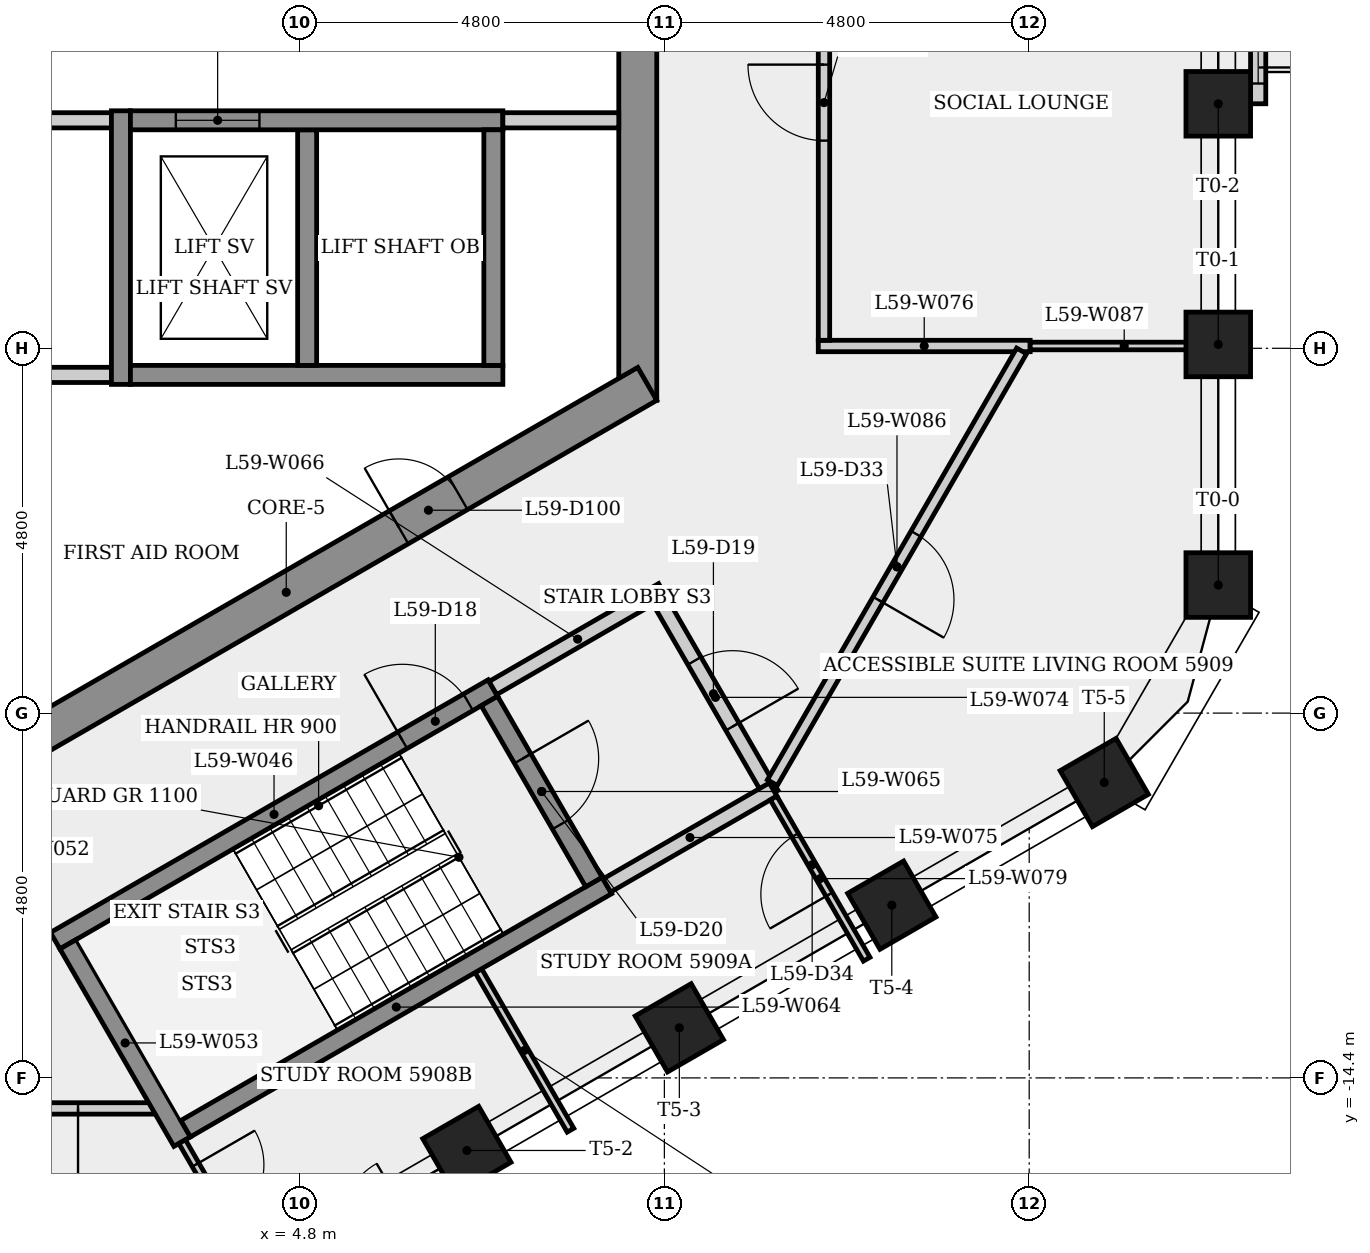
"""IFC4 building model, lengths in metres.
Left out: names, types, materials, properties, quantities, classifications, styles, units other than length and angle.
Written with IfcOpenShell. Run it as: python <this file> out.ifc"""

import sys

from ifc_helpers import new_model, si_unit, direction, frame, frame_2d, origin, origin_2d, place, context, subcontext, project, spatial, rectangle, extrude, element, fill, save


model = new_model("IFC4")
c1 = context("Model", 3, precision=1e-05, world=origin(), true_north=direction((0.0, 1.0)))
c2 = subcontext(c1, "Body", "Model", "MODEL_VIEW")
j1 = project(units=[si_unit("LENGTHUNIT", "METRE"), si_unit("PLANEANGLEUNIT", "RADIAN")], contexts=[c1])
p1 = place(None, origin())
s1 = spatial("IfcSite", under=j1, at=p1, CompositionType="ELEMENT")
p2 = place(p1, origin())
s2 = spatial("IfcBuilding", under=s1, at=p2, CompositionType="ELEMENT")
p3 = place(p2, frame((0.0, 0.0, 222.3)))
s3 = spatial("IfcBuildingStorey", under=s2, at=p3, CompositionType="ELEMENT", Elevation=222.3)
p4 = place(p3, frame((9.25, -5.485, 0.0), z_axis=(0.0, 0.0, 1.0), x_axis=(0.0, 1.0, 0.0)))
e1 = element("IfcWall", 1, at=p4, inside=s3, PredefinedType="SHEAR", context=c2, shape_type="SweptSolid", body=[
    extrude(rectangle(XDim=10.97, YDim=0.5, at=frame_2d((5.485, 0.0))), origin(), (0.0, 0.0, 1.0), 3.4),
])
p5 = place(p4, frame((4.685, 0.0, 0.0)))
e2 = element("IfcOpeningElement", 2, at=p5, cuts=e1, PredefinedType="OPENING", context=c2, shape_type="SweptSolid", body=[
    extrude(rectangle(XDim=1.6, YDim=2.1, at=frame_2d((0.8, 1.05))), frame((0.0, 0.26, 0.0), z_axis=(0.0, -1.0, 0.0), x_axis=(1.0, 0.0, 0.0)), (0.0, 0.0, 1.0), 0.52),
])
p6 = place(p3, frame((-0.125, -10.753, 0.0), z_axis=(0.0, 0.0, 1.0), x_axis=(0.866023993627, 0.500002442456, 0.0)))
e3 = element("IfcWall", 3, at=p6, inside=s3, PredefinedType="SHEAR", context=c2, shape_type="SweptSolid", body=[
    extrude(rectangle(XDim=10.97, YDim=0.5, at=frame_2d((5.485, 0.0))), origin(), (0.0, 0.0, 1.0), 3.4),
])
p7 = place(p6, frame((7.195, 0.0, 0.0)))
e4 = element("IfcOpeningElement", 4, at=p7, cuts=e3, PredefinedType="OPENING", context=c2, shape_type="SweptSolid", body=[
    extrude(rectangle(XDim=0.9, YDim=2.1, at=frame_2d((0.45, 1.05))), frame((0.0, 0.26, 0.0), z_axis=(0.0, -1.0, 0.0), x_axis=(1.0, 0.0, 0.0)), (0.0, 0.0, 1.0), 0.52),
])
for number, where, z_axis, x_axis in (
    (5, (16.887, -7.915, 0.0), (0.0, 0.0, 1.0), (1.0, 0.0, 0.0)),
    (6, (16.887, -4.749, 0.0), (0.0, 0.0, 1.0), (1.0, 0.0, 0.0)),
    (7, (16.887, -1.583, 0.0), (0.0, 0.0, 1.0), (1.0, 0.0, 0.0)),
    (8, (7.001, -15.355, 0.0), (0.0, 0.0, 1.0), (0.5, -0.866, 0.0)),
    (9, (9.797, -13.741, 0.0), (0.0, 0.0, 1.0), (0.5, -0.866, 0.0)),
    (10, (12.592, -12.127, 0.0), (0.0, 0.0, 1.0), (0.5, -0.866, 0.0)),
    (11, (15.387, -10.513, 0.0), (0.0, 0.0, 1.0), (0.5, -0.866, 0.0)),
):
    element("IfcColumn", number, at=place(p3, frame(where, z_axis=z_axis, x_axis=x_axis)), inside=s3, PredefinedType="COLUMN", context=c2, shape_type="SweptSolid", body=[
        extrude(rectangle(XDim=0.85, YDim=0.85, at=origin_2d()), origin(), (0.0, 0.0, 1.0), 3.4),
    ])
p8 = place(p3, frame((17.413, -1.583, 0.0), z_axis=(0.0, 0.0, 1.0), x_axis=(0.0, 1.0, 0.0)))
e12 = element("IfcWall", 12, at=p8, inside=s3, PredefinedType="SOLIDWALL", context=c2, shape_type="SweptSolid", body=[
    extrude(rectangle(XDim=3.166, YDim=0.2, at=frame_2d((1.583, 0.0))), origin(), (0.0, 0.0, 1.0), 3.4),
])
p9 = place(p8, frame((1.083, 0.0, 0.0)))
e13 = element("IfcOpeningElement", 13, at=p9, cuts=e12, PredefinedType="OPENING", context=c2, shape_type="SweptSolid", body=[
    extrude(rectangle(XDim=1.0, YDim=2.4, at=frame_2d((0.5, 1.2))), frame((0.0, 0.11, 0.0), z_axis=(0.0, -1.0, 0.0), x_axis=(1.0, 0.0, 0.0)), (0.0, 0.0, 1.0), 0.22),
])
p10 = place(p8, frame((0.267, 0.0, 0.9)))
e14 = element("IfcOpeningElement", 14, at=p10, cuts=e12, PredefinedType="OPENING", context=c2, shape_type="SweptSolid", body=[
    extrude(rectangle(XDim=0.55, YDim=1.5, at=frame_2d((0.275, 0.75))), frame((0.0, 0.11, 0.0), z_axis=(0.0, -1.0, 0.0), x_axis=(1.0, 0.0, 0.0)), (0.0, 0.0, 1.0), 0.22),
])
p11 = place(p8, frame((2.35, 0.0, 0.9)))
e15 = element("IfcOpeningElement", 15, at=p11, cuts=e12, PredefinedType="OPENING", context=c2, shape_type="SweptSolid", body=[
    extrude(rectangle(XDim=0.55, YDim=1.5, at=frame_2d((0.275, 0.75))), frame((0.0, 0.11, 0.0), z_axis=(0.0, -1.0, 0.0), x_axis=(1.0, 0.0, 0.0)), (0.0, 0.0, 1.0), 0.22),
])
p12 = place(p3, frame((-9.0, -5.15, 0.0), z_axis=(0.0, 0.0, 1.0), x_axis=(1.0, 0.0, 0.0)))
e16 = element("IfcWall", 16, at=p12, inside=s3, PredefinedType="PARTITIONING", context=c2, shape_type="SweptSolid", body=[
    extrude(rectangle(XDim=11.325, YDim=0.2, at=frame_2d((5.663, 0.0))), origin(), (0.0, 0.0, 1.0), 3.05),
])
p13 = place(p3, frame((-9.0, -1.8, 0.0), z_axis=(0.0, 0.0, 1.0), x_axis=(1.0, 0.0, 0.0)))
e17 = element("IfcWall", 17, at=p13, inside=s3, PredefinedType="PARTITIONING", context=c2, shape_type="SweptSolid", body=[
    extrude(rectangle(XDim=11.325, YDim=0.2, at=frame_2d((5.663, 0.0))), origin(), (0.0, 0.0, 1.0), 3.05),
])
p14 = place(p13, frame((2.635, 0.0, 0.0)))
e18 = element("IfcOpeningElement", 18, at=p14, cuts=e17, PredefinedType="OPENING", context=c2, shape_type="SweptSolid", body=[
    extrude(rectangle(XDim=0.9, YDim=2.1, at=frame_2d((0.45, 1.05))), frame((0.0, 0.11, 0.0), z_axis=(0.0, -1.0, 0.0), x_axis=(1.0, 0.0, 0.0)), (0.0, 0.0, 1.0), 0.22),
])
p15 = place(p13, frame((8.488, 0.0, 0.0)))
e19 = element("IfcOpeningElement", 19, at=p15, cuts=e17, PredefinedType="OPENING", context=c2, shape_type="SweptSolid", body=[
    extrude(rectangle(XDim=0.9, YDim=2.1, at=frame_2d((0.45, 1.05))), frame((0.0, 0.11, 0.0), z_axis=(0.0, -1.0, 0.0), x_axis=(1.0, 0.0, 0.0)), (0.0, 0.0, 1.0), 0.22),
])
p16 = place(p3, frame((1.585, -12.595, 0.0), z_axis=(0.0, 0.0, 1.0), x_axis=(0.866036417653, 0.499980922934, 0.0)))
e20 = element("IfcWall", 20, at=p16, inside=s3, PredefinedType="SHEAR", context=c2, shape_type="SweptSolid", body=[
    extrude(rectangle(XDim=6.65, YDim=0.25, at=frame_2d((3.325, 0.0))), origin(), (0.0, 0.0, 1.0), 3.05),
])
p17 = place(p16, frame((5.275, 0.0, 0.0)))
e21 = element("IfcOpeningElement", 21, at=p17, cuts=e20, PredefinedType="OPENING", context=c2, shape_type="SweptSolid", body=[
    extrude(rectangle(XDim=1.0, YDim=2.1, at=frame_2d((0.5, 1.05))), frame((0.0, 0.135, 0.0), z_axis=(0.0, -1.0, 0.0), x_axis=(1.0, 0.0, 0.0)), (0.0, 0.0, 1.0), 0.27),
])
p18 = place(p3, frame((2.45, -5.275, 0.0), z_axis=(0.0, 0.0, 1.0), x_axis=(0.0, 1.0, 0.0)))
e22 = element("IfcWall", 22, at=p18, inside=s3, PredefinedType="SHEAR", context=c2, shape_type="SweptSolid", body=[
    extrude(rectangle(XDim=3.6, YDim=0.25, at=frame_2d((1.8, 0.0))), origin(), (0.0, 0.0, 1.0), 3.05),
])
p19 = place(p3, frame((2.878, -14.802, 0.0), z_axis=(0.0, 0.0, 1.0), x_axis=(-1.0, 0.0, 0.0)))
e23 = element("IfcWall", 23, at=p19, inside=s3, PredefinedType="PARTITIONING", context=c2, shape_type="SweptSolid", body=[
    extrude(rectangle(XDim=2.985, YDim=0.15, at=frame_2d((1.493, 0.0))), origin(), (0.0, 0.0, 1.0), 3.05),
])
p20 = place(p19, frame((0.992, 0.0, 0.0)))
e24 = element("IfcOpeningElement", 24, at=p20, cuts=e23, PredefinedType="OPENING", context=c2, shape_type="SweptSolid", body=[
    extrude(rectangle(XDim=1.0, YDim=2.1, at=frame_2d((0.5, 1.05))), frame((0.0, 0.085, 0.0), z_axis=(0.0, -1.0, 0.0), x_axis=(1.0, 0.0, 0.0)), (0.0, 0.0, 1.0), 0.17),
])
p21 = place(p3, frame((1.756, -12.641, 0.0), z_axis=(0.0, 0.0, 1.0), x_axis=(0.50002537861, -0.866010750942, 0.0)))
e25 = element("IfcWall", 25, at=p21, inside=s3, PredefinedType="SHEAR", context=c2, shape_type="SweptSolid", body=[
    extrude(rectangle(XDim=3.0, YDim=0.25, at=frame_2d((1.5, 0.0))), origin(), (0.0, 0.0, 1.0), 3.05),
])
p22 = place(p3, frame((3.256, -15.239, 0.0), z_axis=(0.0, 0.0, 1.0), x_axis=(0.499940491075, -0.866059758552, 0.0)))
e26 = element("IfcWall", 26, at=p22, inside=s3, PredefinedType="PARTITIONING", context=c2, shape_type="SweptSolid", body=[
    extrude(rectangle(XDim=2.003, YDim=0.1, at=frame_2d((1.001, 0.0))), origin(), (0.0, 0.0, 1.0), 3.05),
])
p23 = place(p22, frame((0.352, 0.0, 0.0)))
e27 = element("IfcOpeningElement", 27, at=p23, cuts=e26, PredefinedType="OPENING", context=c2, shape_type="SweptSolid", body=[
    extrude(rectangle(XDim=0.9, YDim=2.1, at=frame_2d((0.45, 1.05))), frame((0.0, 0.06, 0.0), z_axis=(0.0, -1.0, 0.0), x_axis=(1.0, 0.0, 0.0)), (0.0, 0.0, 1.0), 0.12),
])
p24 = place(p3, frame((2.575, -5.15, 0.0), z_axis=(0.0, 0.0, 1.0), x_axis=(1.0, 0.0, 0.0)))
e28 = element("IfcWall", 28, at=p24, inside=s3, PredefinedType="SHEAR", context=c2, shape_type="SweptSolid", body=[
    extrude(rectangle(XDim=4.9, YDim=0.25, at=frame_2d((2.45, 0.0))), origin(), (0.0, 0.0, 1.0), 3.05),
])
p25 = place(p3, frame((4.9, -1.925, 0.0), z_axis=(0.0, 0.0, 1.0), x_axis=(0.0, -1.0, 0.0)))
e29 = element("IfcWall", 29, at=p25, inside=s3, PredefinedType="SHEAR", context=c2, shape_type="SweptSolid", body=[
    extrude(rectangle(XDim=3.1, YDim=0.25, at=frame_2d((1.55, 0.0))), origin(), (0.0, 0.0, 1.0), 3.4),
])
p26 = place(p3, frame((2.575, -1.8, 0.0), z_axis=(0.0, 0.0, 1.0), x_axis=(1.0, 0.0, 0.0)))
e30 = element("IfcWall", 30, at=p26, inside=s3, PredefinedType="SHEAR", context=c2, shape_type="SweptSolid", body=[
    extrude(rectangle(XDim=4.9, YDim=0.25, at=frame_2d((2.45, 0.0))), origin(), (0.0, 0.0, 1.0), 3.05),
])
p27 = place(p26, frame((0.597, 0.0, 0.0)))
e31 = element("IfcOpeningElement", 31, at=p27, cuts=e30, PredefinedType="OPENING", context=c2, shape_type="SweptSolid", body=[
    extrude(rectangle(XDim=1.1, YDim=2.1, at=frame_2d((0.55, 1.05))), frame((0.0, 0.135, 0.0), z_axis=(0.0, -1.0, 0.0), x_axis=(1.0, 0.0, 0.0)), (0.0, 0.0, 1.0), 0.27),
])
p28 = place(p3, frame((7.153, -12.989, 0.0), z_axis=(0.0, 0.0, 1.0), x_axis=(0.500027571904, -0.866009484553, 0.0)))
e32 = element("IfcWall", 32, at=p28, inside=s3, PredefinedType="PARTITIONING", context=c2, shape_type="SweptSolid", body=[
    extrude(rectangle(XDim=2.424, YDim=0.1, at=frame_2d((1.212, 0.0))), origin(), (0.0, 0.0, 1.0), 3.05),
])
p29 = place(p3, frame((3.301, -15.068, 0.0), z_axis=(0.0, 0.0, 1.0), x_axis=(0.866035036182, 0.499983315828, 0.0)))
e33 = element("IfcWall", 33, at=p29, inside=s3, PredefinedType="SHEAR", context=c2, shape_type="SweptSolid", body=[
    extrude(rectangle(XDim=6.4, YDim=0.25, at=frame_2d((3.2, 0.0))), origin(), (0.0, 0.0, 1.0), 3.05),
])
p30 = place(p3, frame((7.298, -9.441, 0.0), z_axis=(0.0, 0.0, 1.0), x_axis=(0.500034990121, -0.866005201286, 0.0)))
e34 = element("IfcWall", 34, at=p30, inside=s3, PredefinedType="SHEAR", context=c2, shape_type="SweptSolid", body=[
    extrude(rectangle(XDim=2.75, YDim=0.25, at=frame_2d((1.375, 0.0))), origin(), (0.0, 0.0, 1.0), 3.05),
])
p31 = place(p30, frame((0.875, 0.0, 0.0)))
e35 = element("IfcOpeningElement", 35, at=p31, cuts=e34, PredefinedType="OPENING", context=c2, shape_type="SweptSolid", body=[
    extrude(rectangle(XDim=1.0, YDim=2.1, at=frame_2d((0.5, 1.05))), frame((0.0, 0.135, 0.0), z_axis=(0.0, -1.0, 0.0), x_axis=(1.0, 0.0, 0.0)), (0.0, 0.0, 1.0), 0.27),
])
p32 = place(p3, frame((7.344, -9.27, 0.0), z_axis=(0.0, 0.0, 1.0), x_axis=(0.866005588531, 0.500034319456, 0.0)))
e36 = element("IfcWall", 36, at=p32, inside=s3, PredefinedType="PARTITIONING", context=c2, shape_type="SweptSolid", body=[
    extrude(rectangle(XDim=2.575, YDim=0.2, at=frame_2d((1.288, 0.0))), origin(), (0.0, 0.0, 1.0), 3.05),
])
p33 = place(p3, frame((7.35, -1.925, 0.0), z_axis=(0.0, 0.0, 1.0), x_axis=(0.0, -1.0, 0.0)))
e37 = element("IfcWall", 37, at=p33, inside=s3, PredefinedType="SHEAR", context=c2, shape_type="SweptSolid", body=[
    extrude(rectangle(XDim=3.1, YDim=0.25, at=frame_2d((1.55, 0.0))), origin(), (0.0, 0.0, 1.0), 3.4),
])
p34 = place(p3, frame((9.0, -1.8, 0.0), z_axis=(0.0, 0.0, 1.0), x_axis=(-1.0, 0.0, 0.0)))
e38 = element("IfcWall", 38, at=p34, inside=s3, PredefinedType="PARTITIONING", context=c2, shape_type="SweptSolid", body=[
    extrude(rectangle(XDim=1.525, YDim=0.2, at=frame_2d((0.763, 0.0))), origin(), (0.0, 0.0, 1.0), 3.05),
])
p35 = place(p3, frame((9.537, -8.119, 0.0), z_axis=(0.0, 0.0, 1.0), x_axis=(0.500021781351, -0.86601282795, 0.0)))
e39 = element("IfcWall", 39, at=p35, inside=s3, PredefinedType="PARTITIONING", context=c2, shape_type="SweptSolid", body=[
    extrude(rectangle(XDim=2.942, YDim=0.2, at=frame_2d((1.471, 0.0))), origin(), (0.0, 0.0, 1.0), 3.05),
])
p36 = place(p35, frame((0.916, 0.0, 0.0)))
e40 = element("IfcOpeningElement", 40, at=p36, cuts=e39, PredefinedType="OPENING", context=c2, shape_type="SweptSolid", body=[
    extrude(rectangle(XDim=1.0, YDim=2.1, at=frame_2d((0.5, 1.05))), frame((0.0, 0.11, 0.0), z_axis=(0.0, -1.0, 0.0), x_axis=(1.0, 0.0, 0.0)), (0.0, 0.0, 1.0), 0.22),
])
p37 = place(p3, frame((11.031, -10.606, 0.0), z_axis=(0.0, 0.0, 1.0), x_axis=(-0.866014894461, -0.50001820224, 0.0)))
e41 = element("IfcWall", 41, at=p37, inside=s3, PredefinedType="PARTITIONING", context=c2, shape_type="SweptSolid", body=[
    extrude(rectangle(XDim=2.525, YDim=0.2, at=frame_2d((1.262, 0.0))), origin(), (0.0, 0.0, 1.0), 3.05),
])
p38 = place(p3, frame((11.625, -4.77, 0.0), z_axis=(0.0, 0.0, 1.0), x_axis=(1.0, 0.0, 0.0)))
e42 = element("IfcWall", 42, at=p38, inside=s3, PredefinedType="PARTITIONING", context=c2, shape_type="SweptSolid", body=[
    extrude(rectangle(XDim=2.788, YDim=0.15, at=frame_2d((1.394, 0.0))), origin(), (0.0, 0.0, 1.0), 3.05),
])
p39 = place(p3, frame((11.7, -4.695, 0.0), z_axis=(0.0, 0.0, 1.0), x_axis=(0.0, 1.0, 0.0)))
e43 = element("IfcWall", 43, at=p39, inside=s3, PredefinedType="PARTITIONING", context=c2, shape_type="SweptSolid", body=[
    extrude(rectangle(XDim=9.539, YDim=0.15, at=frame_2d((4.77, 0.0))), origin(), (0.0, 0.0, 1.0), 3.05),
])
p40 = place(p39, frame((2.627, 0.0, 0.0)))
e44 = element("IfcOpeningElement", 44, at=p40, cuts=e43, PredefinedType="OPENING", context=c2, shape_type="SweptSolid", body=[
    extrude(rectangle(XDim=1.0, YDim=2.1, at=frame_2d((0.5, 1.05))), frame((0.0, 0.085, 0.0), z_axis=(0.0, -1.0, 0.0), x_axis=(1.0, 0.0, 0.0)), (0.0, 0.0, 1.0), 0.17),
])
p41 = place(p39, frame((7.375, 0.0, 0.0)))
e45 = element("IfcOpeningElement", 45, at=p41, cuts=e43, PredefinedType="OPENING", context=c2, shape_type="SweptSolid", body=[
    extrude(rectangle(XDim=1.0, YDim=2.1, at=frame_2d((0.5, 1.05))), frame((0.0, 0.085, 0.0), z_axis=(0.0, -1.0, 0.0), x_axis=(1.0, 0.0, 0.0)), (0.0, 0.0, 1.0), 0.17),
])
p42 = place(p3, frame((12.262, -12.838, 0.0), z_axis=(0.0, 0.0, 1.0), x_axis=(-0.499998569178, 0.866026229868, 0.0)))
e46 = element("IfcWall", 46, at=p42, inside=s3, PredefinedType="PARTITIONING", context=c2, shape_type="SweptSolid", body=[
    extrude(rectangle(XDim=2.449, YDim=0.1, at=frame_2d((1.225, 0.0))), origin(), (0.0, 0.0, 1.0), 3.05),
])
p43 = place(p42, frame((0.985, 0.0, 0.0)))
e47 = element("IfcOpeningElement", 47, at=p43, cuts=e46, PredefinedType="OPENING", context=c2, shape_type="SweptSolid", body=[
    extrude(rectangle(XDim=0.9, YDim=2.1, at=frame_2d((0.45, 1.05))), frame((0.0, 0.06, 0.0), z_axis=(0.0, -1.0, 0.0), x_axis=(1.0, 0.0, 0.0)), (0.0, 0.0, 1.0), 0.12),
])
p44 = place(p3, frame((14.3, -4.835, 0.0), z_axis=(0.0, 0.0, 1.0), x_axis=(-0.500038206906, -0.866003343893, 0.0)))
e48 = element("IfcWall", 48, at=p44, inside=s3, PredefinedType="PARTITIONING", context=c2, shape_type="SweptSolid", body=[
    extrude(rectangle(XDim=6.559, YDim=0.15, at=frame_2d((3.28, 0.0))), origin(), (0.0, 0.0, 1.0), 3.05),
])
p45 = place(p44, frame((2.78, 0.0, 0.0)))
e49 = element("IfcOpeningElement", 49, at=p45, cuts=e48, PredefinedType="OPENING", context=c2, shape_type="SweptSolid", body=[
    extrude(rectangle(XDim=1.0, YDim=2.1, at=frame_2d((0.5, 1.05))), frame((0.0, 0.085, 0.0), z_axis=(0.0, -1.0, 0.0), x_axis=(1.0, 0.0, 0.0)), (0.0, 0.0, 1.0), 0.17),
])
p46 = place(p3, frame((16.887, -4.77, 0.0), z_axis=(0.0, 0.0, 1.0), x_axis=(-1.0, 0.0, 0.0)))
e50 = element("IfcWall", 50, at=p46, inside=s3, PredefinedType="PARTITIONING", context=c2, shape_type="SweptSolid", body=[
    extrude(rectangle(XDim=2.475, YDim=0.1, at=frame_2d((1.237, 0.0))), origin(), (0.0, 0.0, 1.0), 3.05),
])
p47 = place(p10, origin())
e51 = element("IfcWindow", 51, at=p47, inside=s3, PartitioningType="SINGLE_PANEL", PredefinedType="WINDOW", context=c2, shape_type="SweptSolid", body=[
    extrude(rectangle(XDim=0.55, YDim=1.5, at=frame_2d((0.275, 0.75))), frame((0.0, 0.03, 0.0), z_axis=(0.0, -1.0, 0.0), x_axis=(1.0, 0.0, 0.0)), (0.0, 0.0, 1.0), 0.06),
])
fill(e14, e51)
p48 = place(p27, origin())
e52 = element("IfcDoor", 52, at=p48, inside=s3, OperationType="SLIDING_TO_LEFT", PredefinedType="DOOR", context=c2, shape_type="SweptSolid", body=[
    extrude(rectangle(XDim=1.1, YDim=2.1, at=frame_2d((0.55, 1.05))), frame((0.0, 0.025, 0.0), z_axis=(0.0, -1.0, 0.0), x_axis=(1.0, 0.0, 0.0)), (0.0, 0.0, 1.0), 0.05),
])
fill(e31, e52)
p49 = place(p17, origin())
e53 = element("IfcDoor", 53, at=p49, inside=s3, OperationType="SINGLE_SWING_LEFT", PredefinedType="DOOR", context=c2, shape_type="SweptSolid", body=[
    extrude(rectangle(XDim=1.0, YDim=2.1, at=frame_2d((0.5, 1.05))), frame((0.0, 0.025, 0.0), z_axis=(0.0, -1.0, 0.0), x_axis=(1.0, 0.0, 0.0)), (0.0, 0.0, 1.0), 0.05),
])
fill(e21, e53)
p50 = place(p36, origin())
e54 = element("IfcDoor", 54, at=p50, inside=s3, OperationType="SINGLE_SWING_RIGHT", PredefinedType="DOOR", context=c2, shape_type="SweptSolid", body=[
    extrude(rectangle(XDim=1.0, YDim=2.1, at=frame_2d((0.5, 1.05))), frame((0.0, 0.025, 0.0), z_axis=(0.0, -1.0, 0.0), x_axis=(1.0, 0.0, 0.0)), (0.0, 0.0, 1.0), 0.05),
])
fill(e40, e54)
p51 = place(p31, origin())
e55 = element("IfcDoor", 55, at=p51, inside=s3, OperationType="SINGLE_SWING_LEFT", PredefinedType="DOOR", context=c2, shape_type="SweptSolid", body=[
    extrude(rectangle(XDim=1.0, YDim=2.1, at=frame_2d((0.5, 1.05))), frame((0.0, 0.025, 0.0), z_axis=(0.0, -1.0, 0.0), x_axis=(1.0, 0.0, 0.0)), (0.0, 0.0, 1.0), 0.05),
])
fill(e35, e55)
p52 = place(p40, origin())
e56 = element("IfcDoor", 56, at=p52, inside=s3, OperationType="SINGLE_SWING_RIGHT", PredefinedType="DOOR", context=c2, shape_type="SweptSolid", body=[
    extrude(rectangle(XDim=1.0, YDim=2.1, at=frame_2d((0.5, 1.05))), frame((0.0, 0.025, 0.0), z_axis=(0.0, -1.0, 0.0), x_axis=(1.0, 0.0, 0.0)), (0.0, 0.0, 1.0), 0.05),
])
fill(e44, e56)
p53 = place(p20, origin())
e57 = element("IfcDoor", 57, at=p53, inside=s3, OperationType="SINGLE_SWING_LEFT", PredefinedType="DOOR", context=c2, shape_type="SweptSolid", body=[
    extrude(rectangle(XDim=1.0, YDim=2.1, at=frame_2d((0.5, 1.05))), frame((0.0, 0.025, 0.0), z_axis=(0.0, -1.0, 0.0), x_axis=(1.0, 0.0, 0.0)), (0.0, 0.0, 1.0), 0.05),
])
fill(e24, e57)
p54 = place(p23, origin())
e58 = element("IfcDoor", 58, at=p54, inside=s3, OperationType="SINGLE_SWING_LEFT", PredefinedType="DOOR", context=c2, shape_type="SweptSolid", body=[
    extrude(rectangle(XDim=0.9, YDim=2.1, at=frame_2d((0.45, 1.05))), frame((0.0, 0.025, 0.0), z_axis=(0.0, -1.0, 0.0), x_axis=(1.0, 0.0, 0.0)), (0.0, 0.0, 1.0), 0.05),
])
fill(e27, e58)
p55 = place(p45, origin())
e59 = element("IfcDoor", 59, at=p55, inside=s3, OperationType="SINGLE_SWING_RIGHT", PredefinedType="DOOR", context=c2, shape_type="SweptSolid", body=[
    extrude(rectangle(XDim=1.0, YDim=2.1, at=frame_2d((0.5, 1.05))), frame((0.0, 0.025, 0.0), z_axis=(0.0, -1.0, 0.0), x_axis=(1.0, 0.0, 0.0)), (0.0, 0.0, 1.0), 0.05),
])
fill(e49, e59)
p56 = place(p43, origin())
e60 = element("IfcDoor", 60, at=p56, inside=s3, OperationType="SINGLE_SWING_LEFT", PredefinedType="DOOR", context=c2, shape_type="SweptSolid", body=[
    extrude(rectangle(XDim=0.9, YDim=2.1, at=frame_2d((0.45, 1.05))), frame((0.0, 0.025, 0.0), z_axis=(0.0, -1.0, 0.0), x_axis=(1.0, 0.0, 0.0)), (0.0, 0.0, 1.0), 0.05),
])
fill(e47, e60)
p57 = place(p7, origin())
e61 = element("IfcDoor", 61, at=p57, inside=s3, OperationType="SINGLE_SWING_LEFT", PredefinedType="DOOR", context=c2, shape_type="SweptSolid", body=[
    extrude(rectangle(XDim=0.9, YDim=2.1, at=frame_2d((0.45, 1.05))), frame((0.0, 0.025, 0.0), z_axis=(0.0, -1.0, 0.0), x_axis=(1.0, 0.0, 0.0)), (0.0, 0.0, 1.0), 0.05),
])
fill(e4, e61)
save(model, sys.argv[1])
